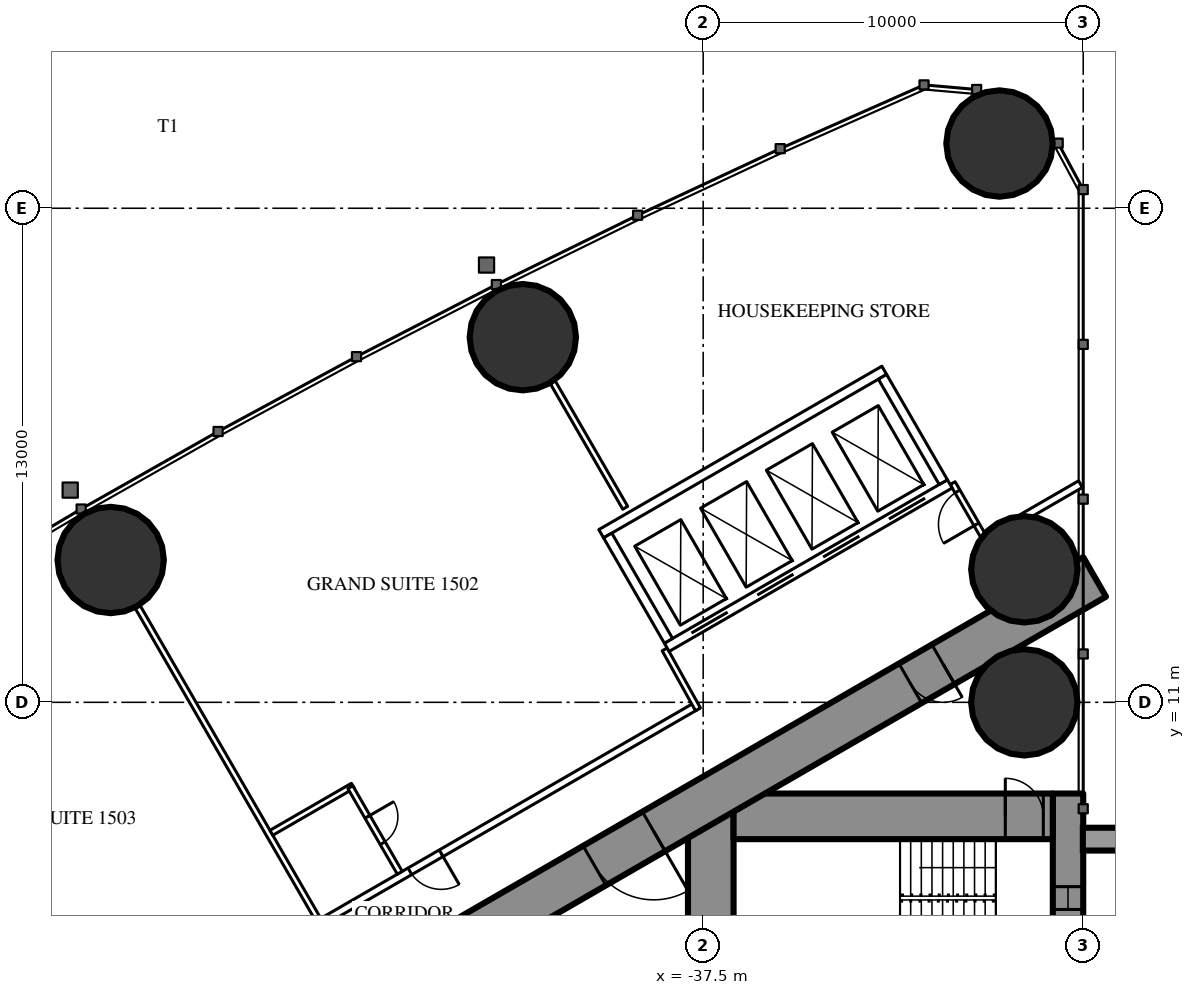
"""IFC4 building model, lengths in metres.
Left out: names, types, materials, properties, quantities, classifications, styles, units other than length and angle.
Written with IfcOpenShell. Run it as: python <this file> out.ifc"""

import sys

from ifc_helpers import new_model, si_unit, direction, frame, frame_2d, origin, origin_2d, place, context, subcontext, project, spatial, rectangle, hollow_circle, extrude, element, fill, save


model = new_model("IFC4")
c1 = context("Model", 3, precision=1e-05, world=origin(), true_north=direction((0.0, 1.0)))
c2 = subcontext(c1, "Body", "Model", "MODEL_VIEW")
j1 = project(units=[si_unit("LENGTHUNIT", "METRE"), si_unit("PLANEANGLEUNIT", "RADIAN")], contexts=[c1])
p1 = place(None, origin())
s1 = spatial("IfcSite", under=j1, at=p1, CompositionType="ELEMENT")
p2 = place(p1, origin())
s2 = spatial("IfcBuilding", under=s1, at=p2, CompositionType="ELEMENT")
p3 = place(p2, frame((0.0, 0.0, 60.0)))
s3 = spatial("IfcBuildingStorey", under=s2, at=p3, CompositionType="ELEMENT", Elevation=60.0)
for number, where, z_axis, x_axis in (
    (1, (-29.703, 25.703, 0.0), (0.0, 0.0, 1.0), (1.0, 0.0, 0.0)),
    (2, (-29.05, 11.0, 0.0), (0.0, 0.0, 1.0), (1.0, 0.0, 0.0)),
    (3, (-29.05, 14.5, 0.0), (0.0, 0.0, 1.0), (1.0, 0.0, 0.0)),
    (4, (-42.245, 20.607, 0.0), (0.0, 0.0, 1.0), (1.0, 0.0, 0.0)),
    (5, (-53.09, 14.745, 0.0), (0.0, 0.0, 1.0), (1.0, 0.0, 0.0)),
):
    element("IfcColumn", number, at=place(p3, frame(where, z_axis=z_axis, x_axis=x_axis)), inside=s3, PredefinedType="COLUMN", context=c2, shape_type="SweptSolid", body=[
        extrude(hollow_circle(Radius=1.4, WallThickness=0.12, at=origin_2d()), origin(), (0.0, 0.0, 1.0), 3.5),
    ])
p4 = place(p3, frame((-27.9, 8.6, 0.0), z_axis=(0.0, 0.0, 1.0), x_axis=(0.0, -1.0, 0.0)))
e6 = element("IfcWall", 6, at=p4, inside=s3, PredefinedType="SHEAR", context=c2, shape_type="SweptSolid", body=[
    extrude(rectangle(XDim=17.2, YDim=0.8, at=frame_2d((8.6, 0.0))), origin(), (0.0, 0.0, 1.0), 3.5),
])
p5 = place(p4, frame((2.45, 0.0, 0.6)))
e7 = element("IfcOpeningElement", 7, at=p5, cuts=e6, PredefinedType="OPENING", context=c2, shape_type="SweptSolid", body=[
    extrude(rectangle(XDim=0.6, YDim=2.1, at=frame_2d((0.3, 1.05))), frame((0.0, 0.41, 0.0), z_axis=(0.0, -1.0, 0.0), x_axis=(1.0, 0.0, 0.0)), (0.0, 0.0, 1.0), 0.82),
])
p6 = place(p4, frame((14.15, 0.0, 0.6)))
e8 = element("IfcOpeningElement", 8, at=p6, cuts=e6, PredefinedType="OPENING", context=c2, shape_type="SweptSolid", body=[
    extrude(rectangle(XDim=0.6, YDim=2.1, at=frame_2d((0.3, 1.05))), frame((0.0, 0.41, 0.0), z_axis=(0.0, -1.0, 0.0), x_axis=(1.0, 0.0, 0.0)), (0.0, 0.0, 1.0), 0.82),
])
p7 = place(p3, frame((-37.3, 8.6, 0.0), z_axis=(0.0, 0.0, 1.0), x_axis=(0.0, -1.0, 0.0)))
e9 = element("IfcWall", 9, at=p7, inside=s3, PredefinedType="SHEAR", context=c2, shape_type="SweptSolid", body=[
    extrude(rectangle(XDim=17.2, YDim=1.2, at=frame_2d((8.6, 0.0))), origin(), (0.0, 0.0, 1.0), 3.5),
])
p8 = place(p7, frame((7.7, 0.0, 0.0)))
e10 = element("IfcOpeningElement", 10, at=p8, cuts=e9, PredefinedType="OPENING", context=c2, shape_type="SweptSolid", body=[
    extrude(rectangle(XDim=1.8, YDim=2.2, at=frame_2d((0.9, 1.1))), frame((0.0, 0.61, 0.0), z_axis=(0.0, -1.0, 0.0), x_axis=(1.0, 0.0, 0.0)), (0.0, 0.0, 1.0), 1.22),
])
p9 = place(p3, frame((-28.3, 8.0, 0.0), z_axis=(0.0, 0.0, 1.0), x_axis=(-1.0, 0.0, 0.0)))
e11 = element("IfcWall", 11, at=p9, inside=s3, PredefinedType="SHEAR", context=c2, shape_type="SweptSolid", body=[
    extrude(rectangle(XDim=8.4, YDim=1.2, at=frame_2d((4.2, 0.0))), origin(), (0.0, 0.0, 1.0), 3.5),
])
p10 = place(p9, frame((0.25, 0.0, 0.0)))
e12 = element("IfcOpeningElement", 12, at=p10, cuts=e11, PredefinedType="OPENING", context=c2, shape_type="SweptSolid", body=[
    extrude(rectangle(XDim=1.0, YDim=2.2, at=frame_2d((0.5, 1.1))), frame((0.0, 0.61, 0.0), z_axis=(0.0, -1.0, 0.0), x_axis=(1.0, 0.0, 0.0)), (0.0, 0.0, 1.0), 1.22),
])
p11 = place(p3, frame((-27.2, 14.3, 0.0), z_axis=(0.0, 0.0, 1.0), x_axis=(-0.866026593062, -0.499997940104, 0.0)))
e13 = element("IfcWall", 13, at=p11, inside=s3, PredefinedType="SHEAR", context=c2, shape_type="SweptSolid", body=[
    extrude(rectangle(XDim=28.946, YDim=1.2, at=frame_2d((14.473, 0.0))), origin(), (0.0, 0.0, 1.0), 3.5),
])
p12 = place(p11, frame((4.6, 0.0, 0.0)))
e14 = element("IfcOpeningElement", 14, at=p12, cuts=e13, PredefinedType="OPENING", context=c2, shape_type="SweptSolid", body=[
    extrude(rectangle(XDim=1.0, YDim=2.2, at=frame_2d((0.5, 1.1))), frame((0.0, 0.61, 0.0), z_axis=(0.0, -1.0, 0.0), x_axis=(1.0, 0.0, 0.0)), (0.0, 0.0, 1.0), 1.22),
])
p13 = place(p11, frame((13.395, 0.0, 0.0)))
e15 = element("IfcOpeningElement", 15, at=p13, cuts=e13, PredefinedType="OPENING", context=c2, shape_type="SweptSolid", body=[
    extrude(rectangle(XDim=1.8, YDim=2.2, at=frame_2d((0.9, 1.1))), frame((0.0, 0.61, 0.0), z_axis=(0.0, -1.0, 0.0), x_axis=(1.0, 0.0, 0.0)), (0.0, 0.0, 1.0), 1.22),
])
p14 = place(p3, frame((-47.627, 5.278, 0.0), z_axis=(0.0, 0.0, 1.0), x_axis=(-0.500009844318, 0.86601972009, 0.0)))
e16 = element("IfcWall", 16, at=p14, inside=s3, PredefinedType="PARTITIONING", context=c2, shape_type="SweptSolid", body=[
    extrude(rectangle(XDim=9.51, YDim=0.15, at=frame_2d((4.755, 0.0))), origin(), (0.0, 0.0, 1.0), 2.25),
])
p15 = place(p3, frame((-39.551, 16.119, 0.0), z_axis=(0.0, 0.0, 1.0), x_axis=(-0.500014214979, 0.866017196607, 0.0)))
e17 = element("IfcWall", 17, at=p15, inside=s3, PredefinedType="PARTITIONING", context=c2, shape_type="SweptSolid", body=[
    extrude(rectangle(XDim=3.815, YDim=0.15, at=frame_2d((1.907, 0.0))), origin(), (0.0, 0.0, 1.0), 3.25),
])
p16 = place(p3, frame((-27.572, 16.741, 0.0), z_axis=(0.0, 0.0, 1.0), x_axis=(-0.866034618596, -0.499984039138, 0.0)))
e18 = element("IfcWall", 18, at=p16, inside=s3, PredefinedType="PARTITIONING", context=c2, shape_type="SweptSolid", body=[
    extrude(rectangle(XDim=2.854, YDim=0.2, at=frame_2d((1.427, 0.0))), origin(), (0.0, 0.0, 1.0), 3.25),
])
p17 = place(p3, frame((-37.7, 10.894, 0.0), z_axis=(0.0, 0.0, 1.0), x_axis=(-0.866027905338, -0.499995667157, 0.0)))
e19 = element("IfcWall", 19, at=p17, inside=s3, PredefinedType="PARTITIONING", context=c2, shape_type="SweptSolid", body=[
    extrude(rectangle(XDim=21.787, YDim=0.2, at=frame_2d((10.894, 0.0))), origin(), (0.0, 0.0, 1.0), 3.25),
])
p18 = place(p17, frame((20.237, 0.0, 0.0)))
e20 = element("IfcOpeningElement", 20, at=p18, cuts=e19, PredefinedType="OPENING", context=c2, shape_type="SweptSolid", body=[
    extrude(rectangle(XDim=0.95, YDim=2.2, at=frame_2d((0.475, 1.1))), frame((0.0, 0.11, 0.0), z_axis=(0.0, -1.0, 0.0), x_axis=(1.0, 0.0, 0.0)), (0.0, 0.0, 1.0), 0.22),
])
p19 = place(p17, frame((7.73, 0.0, 0.0)))
e21 = element("IfcOpeningElement", 21, at=p19, cuts=e19, PredefinedType="OPENING", context=c2, shape_type="SweptSolid", body=[
    extrude(rectangle(XDim=0.95, YDim=2.2, at=frame_2d((0.475, 1.1))), frame((0.0, 0.11, 0.0), z_axis=(0.0, -1.0, 0.0), x_axis=(1.0, 0.0, 0.0)), (0.0, 0.0, 1.0), 0.22),
])
p20 = place(p3, frame((-38.513, 12.392, 0.0), z_axis=(0.0, 0.0, 1.0), x_axis=(0.485585508183, -0.874189175317, 0.0)))
e22 = element("IfcWall", 22, at=p20, inside=s3, PredefinedType="PARTITIONING", context=c2, shape_type="SweptSolid", body=[
    extrude(rectangle(XDim=1.805, YDim=0.15, at=frame_2d((0.902, 0.0))), origin(), (0.0, 0.0, 1.0), 3.25),
])
p21 = place(p3, frame((-30.033, 15.205, 0.0), z_axis=(0.0, 0.0, 1.0), x_axis=(-0.499980071345, 0.866036909293, 0.0)))
e23 = element("IfcWall", 23, at=p21, inside=s3, PredefinedType="PARTITIONING", context=c2, shape_type="SweptSolid", body=[
    extrude(rectangle(XDim=1.805, YDim=0.15, at=frame_2d((0.902, 0.0))), origin(), (0.0, 0.0, 1.0), 3.25),
])
p22 = place(p21, frame((0.552, 0.0, 0.0)))
e24 = element("IfcOpeningElement", 24, at=p22, cuts=e23, PredefinedType="OPENING", context=c2, shape_type="SweptSolid", body=[
    extrude(rectangle(XDim=1.0, YDim=2.2, at=frame_2d((0.5, 1.1))), frame((0.0, 0.085, 0.0), z_axis=(0.0, -1.0, 0.0), x_axis=(1.0, 0.0, 0.0)), (0.0, 0.0, 1.0), 0.17),
])
p23 = place(p3, frame((-46.719, 8.804, 0.0), z_axis=(0.0, 0.0, 1.0), x_axis=(-0.866006523861, -0.500032699561, 0.0)))
e25 = element("IfcWall", 25, at=p23, inside=s3, PredefinedType="PARTITIONING", context=c2, shape_type="SweptSolid", body=[
    extrude(rectangle(XDim=2.475, YDim=0.15, at=frame_2d((1.237, 0.0))), origin(), (0.0, 0.0, 1.0), 3.25),
])
p24 = place(p3, frame((-45.483, 6.515, 0.0), z_axis=(0.0, 0.0, 1.0), x_axis=(-0.500006934395, 0.866021400173, 0.0)))
e26 = element("IfcWall", 26, at=p24, inside=s3, PredefinedType="PARTITIONING", context=c2, shape_type="SweptSolid", body=[
    extrude(rectangle(XDim=2.6, YDim=0.15, at=frame_2d((1.3, 0.0))), origin(), (0.0, 0.0, 1.0), 3.25),
])
p25 = place(p24, frame((0.9, 0.0, 0.0)))
e27 = element("IfcOpeningElement", 27, at=p25, cuts=e26, PredefinedType="OPENING", context=c2, shape_type="SweptSolid", body=[
    extrude(rectangle(XDim=0.8, YDim=2.2, at=frame_2d((0.4, 1.1))), frame((0.0, 0.085, 0.0), z_axis=(0.0, -1.0, 0.0), x_axis=(1.0, 0.0, 0.0)), (0.0, 0.0, 1.0), 0.17),
])
p26 = place(p3, frame((-31.01, 16.747, 0.0), z_axis=(0.0, 0.0, 1.0), x_axis=(-0.866028165386, -0.499995216735, 0.0)))
e28 = element("IfcWall", 28, at=p26, inside=s3, PredefinedType="PARTITIONING", context=c2, shape_type="SweptSolid", body=[
    extrude(rectangle(XDim=8.6, YDim=0.25, at=frame_2d((4.3, 0.0))), origin(), (0.0, 0.0, 1.0), 3.25),
])
p27 = place(p26, frame((0.75, 0.0, 0.0)))
e29 = element("IfcOpeningElement", 29, at=p27, cuts=e28, PredefinedType="OPENING", context=c2, shape_type="SweptSolid", body=[
    extrude(rectangle(XDim=1.1, YDim=2.2, at=frame_2d((0.55, 1.1))), frame((0.0, 0.135, 0.0), z_axis=(0.0, -1.0, 0.0), x_axis=(1.0, 0.0, 0.0)), (0.0, 0.0, 1.0), 0.27),
])
p28 = place(p26, frame((2.75, 0.0, 0.0)))
e30 = element("IfcOpeningElement", 30, at=p28, cuts=e28, PredefinedType="OPENING", context=c2, shape_type="SweptSolid", body=[
    extrude(rectangle(XDim=1.1, YDim=2.2, at=frame_2d((0.55, 1.1))), frame((0.0, 0.135, 0.0), z_axis=(0.0, -1.0, 0.0), x_axis=(1.0, 0.0, 0.0)), (0.0, 0.0, 1.0), 0.27),
])
p29 = place(p26, frame((4.75, 0.0, 0.0)))
e31 = element("IfcOpeningElement", 31, at=p29, cuts=e28, PredefinedType="OPENING", context=c2, shape_type="SweptSolid", body=[
    extrude(rectangle(XDim=1.1, YDim=2.2, at=frame_2d((0.55, 1.1))), frame((0.0, 0.135, 0.0), z_axis=(0.0, -1.0, 0.0), x_axis=(1.0, 0.0, 0.0)), (0.0, 0.0, 1.0), 0.27),
])
p30 = place(p26, frame((6.75, 0.0, 0.0)))
e32 = element("IfcOpeningElement", 32, at=p30, cuts=e28, PredefinedType="OPENING", context=c2, shape_type="SweptSolid", body=[
    extrude(rectangle(XDim=1.1, YDim=2.2, at=frame_2d((0.55, 1.1))), frame((0.0, 0.135, 0.0), z_axis=(0.0, -1.0, 0.0), x_axis=(1.0, 0.0, 0.0)), (0.0, 0.0, 1.0), 0.27),
])
p31 = place(p3, frame((-32.736, 19.736, 0.0), z_axis=(0.0, 0.0, 1.0), x_axis=(-0.866028165386, -0.499995216735, 0.0)))
e33 = element("IfcWall", 33, at=p31, inside=s3, PredefinedType="PARTITIONING", context=c2, shape_type="SweptSolid", body=[
    extrude(rectangle(XDim=8.6, YDim=0.25, at=frame_2d((4.3, 0.0))), origin(), (0.0, 0.0, 1.0), 3.25),
])
p32 = place(p3, frame((-31.181, 16.793, 0.0), z_axis=(0.0, 0.0, 1.0), x_axis=(-0.499929347863, 0.866066190972, 0.0)))
e34 = element("IfcWall", 34, at=p32, inside=s3, PredefinedType="PARTITIONING", context=c2, shape_type="SweptSolid", body=[
    extrude(rectangle(XDim=3.201, YDim=0.25, at=frame_2d((1.6, 0.0))), origin(), (0.0, 0.0, 1.0), 3.25),
])
p33 = place(p3, frame((-38.413, 12.618, 0.0), z_axis=(0.0, 0.0, 1.0), x_axis=(-0.499872130319, 0.866099216793, 0.0)))
e35 = element("IfcWall", 35, at=p33, inside=s3, PredefinedType="PARTITIONING", context=c2, shape_type="SweptSolid", body=[
    extrude(rectangle(XDim=3.2, YDim=0.25, at=frame_2d((1.6, 0.0))), origin(), (0.0, 0.0, 1.0), 3.25),
])
p34 = place(p25, origin())
e36 = element("IfcDoor", 36, at=p34, inside=s3, OperationType="SINGLE_SWING_RIGHT", PredefinedType="DOOR", context=c2, shape_type="SweptSolid", body=[
    extrude(rectangle(XDim=0.8, YDim=2.2, at=frame_2d((0.4, 1.1))), frame((0.0, 0.025, 0.0), z_axis=(0.0, -1.0, 0.0), x_axis=(1.0, 0.0, 0.0)), (0.0, 0.0, 1.0), 0.05),
])
fill(e27, e36)
p35 = place(p19, origin())
e37 = element("IfcDoor", 37, at=p35, inside=s3, OperationType="SINGLE_SWING_LEFT", PredefinedType="DOOR", context=c2, shape_type="SweptSolid", body=[
    extrude(rectangle(XDim=0.95, YDim=2.2, at=frame_2d((0.475, 1.1))), frame((0.0, 0.025, 0.0), z_axis=(0.0, -1.0, 0.0), x_axis=(1.0, 0.0, 0.0)), (0.0, 0.0, 1.0), 0.05),
])
fill(e21, e37)
p36 = place(p22, origin())
e38 = element("IfcDoor", 38, at=p36, inside=s3, OperationType="SINGLE_SWING_LEFT", PredefinedType="DOOR", context=c2, shape_type="SweptSolid", body=[
    extrude(rectangle(XDim=1.0, YDim=2.2, at=frame_2d((0.5, 1.1))), frame((0.0, 0.025, 0.0), z_axis=(0.0, -1.0, 0.0), x_axis=(1.0, 0.0, 0.0)), (0.0, 0.0, 1.0), 0.05),
])
fill(e24, e38)
p37 = place(p12, origin())
e39 = element("IfcDoor", 39, at=p37, inside=s3, OperationType="SINGLE_SWING_LEFT", PredefinedType="DOOR", context=c2, shape_type="SweptSolid", body=[
    extrude(rectangle(XDim=1.0, YDim=2.2, at=frame_2d((0.5, 1.1))), frame((0.0, 0.025, 0.0), z_axis=(0.0, -1.0, 0.0), x_axis=(1.0, 0.0, 0.0)), (0.0, 0.0, 1.0), 0.05),
])
fill(e14, e39)
p38 = place(p13, origin())
e40 = element("IfcDoor", 40, at=p38, inside=s3, OperationType="DOUBLE_DOOR_SINGLE_SWING", PredefinedType="DOOR", context=c2, shape_type="SweptSolid", body=[
    extrude(rectangle(XDim=1.8, YDim=2.2, at=frame_2d((0.9, 1.1))), frame((0.0, 0.025, 0.0), z_axis=(0.0, -1.0, 0.0), x_axis=(1.0, 0.0, 0.0)), (0.0, 0.0, 1.0), 0.05),
])
fill(e15, e40)
p39 = place(p10, origin())
e41 = element("IfcDoor", 41, at=p39, inside=s3, OperationType="SINGLE_SWING_RIGHT", PredefinedType="DOOR", context=c2, shape_type="SweptSolid", body=[
    extrude(rectangle(XDim=1.0, YDim=2.2, at=frame_2d((0.5, 1.1))), frame((0.0, 0.025, 0.0), z_axis=(0.0, -1.0, 0.0), x_axis=(1.0, 0.0, 0.0)), (0.0, 0.0, 1.0), 0.05),
])
fill(e12, e41)
p40 = place(p27, origin())
e42 = element("IfcDoor", 42, at=p40, inside=s3, OperationType="DOUBLE_DOOR_SLIDING", PredefinedType="USERDEFINED", context=c2, shape_type="SweptSolid", body=[
    extrude(rectangle(XDim=1.1, YDim=2.2, at=frame_2d((0.55, 1.1))), frame((0.0, 0.025, 0.0), z_axis=(0.0, -1.0, 0.0), x_axis=(1.0, 0.0, 0.0)), (0.0, 0.0, 1.0), 0.05),
])
fill(e29, e42)
p41 = place(p28, origin())
e43 = element("IfcDoor", 43, at=p41, inside=s3, OperationType="DOUBLE_DOOR_SLIDING", PredefinedType="USERDEFINED", context=c2, shape_type="SweptSolid", body=[
    extrude(rectangle(XDim=1.1, YDim=2.2, at=frame_2d((0.55, 1.1))), frame((0.0, 0.025, 0.0), z_axis=(0.0, -1.0, 0.0), x_axis=(1.0, 0.0, 0.0)), (0.0, 0.0, 1.0), 0.05),
])
fill(e30, e43)
p42 = place(p29, origin())
e44 = element("IfcDoor", 44, at=p42, inside=s3, OperationType="DOUBLE_DOOR_SLIDING", PredefinedType="USERDEFINED", context=c2, shape_type="SweptSolid", body=[
    extrude(rectangle(XDim=1.1, YDim=2.2, at=frame_2d((0.55, 1.1))), frame((0.0, 0.025, 0.0), z_axis=(0.0, -1.0, 0.0), x_axis=(1.0, 0.0, 0.0)), (0.0, 0.0, 1.0), 0.05),
])
fill(e31, e44)
p43 = place(p30, origin())
e45 = element("IfcDoor", 45, at=p43, inside=s3, OperationType="DOUBLE_DOOR_SLIDING", PredefinedType="USERDEFINED", context=c2, shape_type="SweptSolid", body=[
    extrude(rectangle(XDim=1.1, YDim=2.2, at=frame_2d((0.55, 1.1))), frame((0.0, 0.025, 0.0), z_axis=(0.0, -1.0, 0.0), x_axis=(1.0, 0.0, 0.0)), (0.0, 0.0, 1.0), 0.05),
])
fill(e32, e45)
p44 = place(p5, origin())
e46 = element("IfcWindow", 46, at=p44, inside=s3, PartitioningType="SINGLE_PANEL", PredefinedType="WINDOW", context=c2, shape_type="SweptSolid", body=[
    extrude(rectangle(XDim=0.6, YDim=2.1, at=frame_2d((0.3, 1.05))), frame((0.0, 0.03, 0.0), z_axis=(0.0, -1.0, 0.0), x_axis=(1.0, 0.0, 0.0)), (0.0, 0.0, 1.0), 0.06),
])
fill(e7, e46)
save(model, sys.argv[1])
